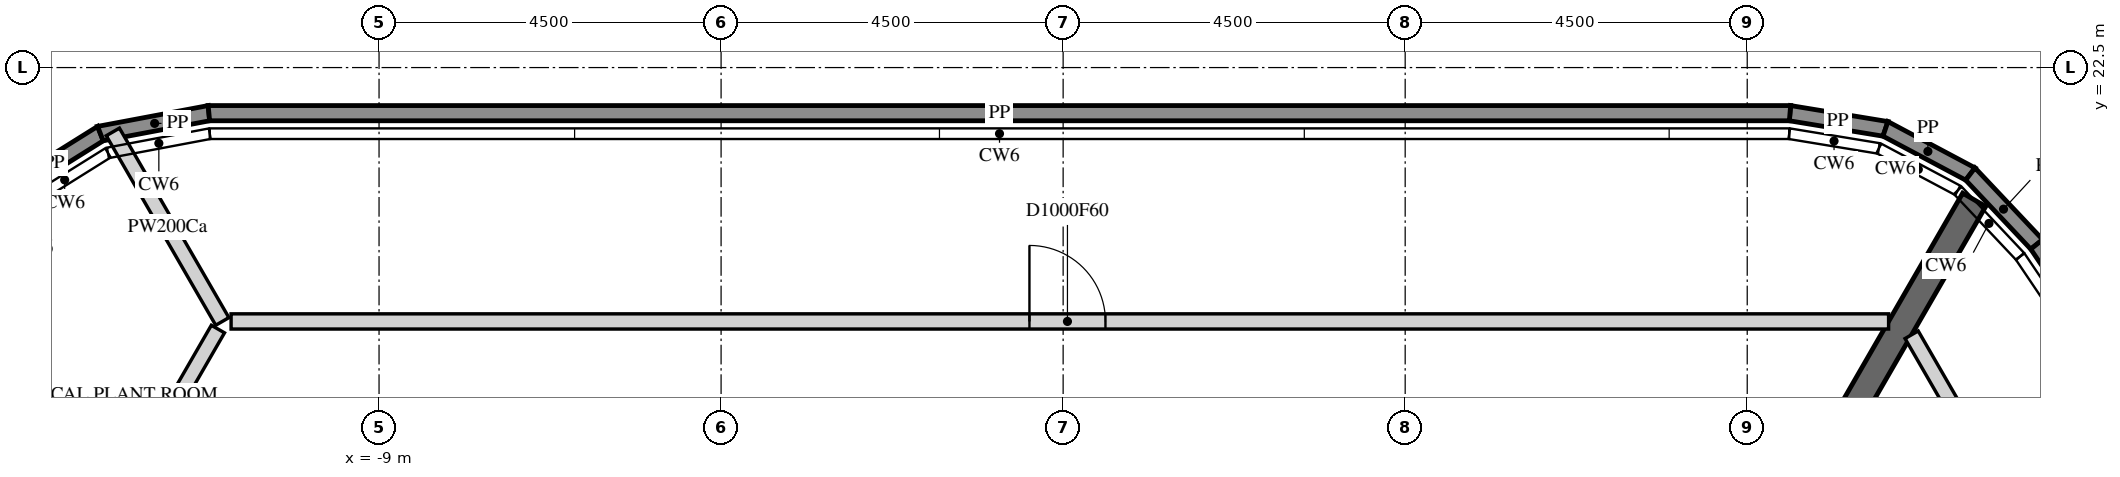
"""IFC4 building model, lengths in metres.
Left out: names, types, materials, properties, quantities, classifications, styles, units other than length and angle.
Written with IfcOpenShell. Run it as: python <this file> out.ifc"""

import sys

from ifc_helpers import new_model, si_unit, direction, frame, frame_2d, origin, place, context, subcontext, project, spatial, polyline, rectangle, outline, extrude, element, fill, save


model = new_model("IFC4")
c1 = context("Model", 3, precision=1e-05, world=origin(), true_north=direction((0.0, 1.0)))
c2 = subcontext(c1, "Body", "Model", "MODEL_VIEW")
j1 = project(units=[si_unit("LENGTHUNIT", "METRE"), si_unit("PLANEANGLEUNIT", "RADIAN")], contexts=[c1])
p1 = place(None, origin())
s1 = spatial("IfcSite", under=j1, at=p1, CompositionType="ELEMENT")
p2 = place(p1, origin())
s2 = spatial("IfcBuilding", under=s1, at=p2, CompositionType="ELEMENT")
p3 = place(p2, frame((0.0, 0.0, 388.2)))
s3 = spatial("IfcBuildingStorey", under=s2, at=p3, CompositionType="ELEMENT", Elevation=388.2)
p4 = place(p3, frame((9.562, 21.9, 4.5), z_axis=(0.0, 0.0, 1.0), x_axis=(0.986779937267, -0.162065898346, 0.0)))
e1 = element("IfcWall", 1, at=p4, inside=s3, PredefinedType="PARAPET", context=c2, shape_type="SweptSolid", body=[
    extrude(outline(polyline([(0.008, -0.1), (1.257, -0.1), (1.289, 0.1), (-0.008, 0.1), (0.008, -0.1)])), origin(), (0.0, 0.0, 1.0), 1.1),
])
p5 = place(p3, frame((10.819, 21.694, 4.5), z_axis=(0.0, 0.0, 1.0), x_axis=(0.88290815292, -0.469545731008, 0.0)))
e2 = element("IfcWall", 2, at=p5, inside=s3, PredefinedType="PARAPET", context=c2, shape_type="SweptSolid", body=[
    extrude(outline(polyline([(0.016, -0.1), (1.248, -0.1), (1.281, 0.1), (-0.016, 0.1), (0.016, -0.1)])), origin(), (0.0, 0.0, 1.0), 1.1),
])
p6 = place(p3, frame((11.935, 21.1, 4.5), z_axis=(0.0, 0.0, 1.0), x_axis=(0.686285527981, -0.727332230885, 0.0)))
e3 = element("IfcWall", 3, at=p6, inside=s3, PredefinedType="PARAPET", context=c2, shape_type="SweptSolid", body=[
    extrude(outline(polyline([(0.016, -0.1), (1.265, -0.1), (1.281, 0.1), (-0.016, 0.1), (0.016, -0.1)])), origin(), (0.0, 0.0, 1.0), 1.1),
])
p7 = place(p3, frame((12.809, 20.174, 4.5), z_axis=(0.0, 0.0, 1.0), x_axis=(0.559199078033, -0.829033407727, 0.0)))
e4 = element("IfcWall", 4, at=p7, inside=s3, PredefinedType="PARAPET", context=c2, shape_type="SweptSolid", body=[
    extrude(outline(polyline([(0.008, -0.1), (20.792, -0.1), (20.81, 0.1), (-0.008, 0.1), (0.008, -0.1)])), origin(), (0.0, 0.0, 1.0), 1.1),
])
p8 = place(p3, frame((-13.89, 20.866, 4.5), z_axis=(0.0, 0.0, 1.0), x_axis=(0.848083831846, 0.529862070884, 0.0)))
e5 = element("IfcWall", 5, at=p8, inside=s3, PredefinedType="PARAPET", context=c2, shape_type="SweptSolid", body=[
    extrude(outline(polyline([(0.019, -0.1), (1.424, -0.1), (1.462, 0.1), (-0.019, 0.1), (0.019, -0.1)])), origin(), (0.0, 0.0, 1.0), 1.1),
])
p9 = place(p3, frame((-12.666, 21.631, 4.5), z_axis=(0.0, 0.0, 1.0), x_axis=(0.982729187844, 0.185049570005, 0.0)))
e6 = element("IfcWall", 6, at=p9, inside=s3, PredefinedType="PARAPET", context=c2, shape_type="SweptSolid", body=[
    extrude(outline(polyline([(0.019, -0.1), (1.443, -0.1), (1.462, 0.1), (-0.019, 0.1), (0.019, -0.1)])), origin(), (0.0, 0.0, 1.0), 1.1),
])
p10 = place(p3, frame((-11.238, 21.9, 4.5), z_axis=(0.0, 0.0, 1.0), x_axis=(1.0, 0.0, 0.0)))
e7 = element("IfcWall", 7, at=p10, inside=s3, PredefinedType="PARAPET", context=c2, shape_type="SweptSolid", body=[
    extrude(outline(polyline([(0.009, -0.1), (20.793, -0.1), (20.809, 0.1), (-0.009, 0.1), (0.009, -0.1)])), origin(), (0.0, 0.0, 1.0), 1.1),
])
p11 = place(p3, frame((5.773, 10.0, -0.2), z_axis=(0.0, 0.0, 1.0), x_axis=(0.50001273609, 0.866018050475, 0.0)))
e8 = element("IfcWall", 8, at=p11, inside=s3, PredefinedType="SHEAR", context=c2, shape_type="SweptSolid", body=[
    extrude(rectangle(XDim=12.425, YDim=0.35, at=frame_2d((6.212, 0.0))), origin(), (0.0, 0.0, 1.0), 4.5),
])
p12 = place(p11, frame((5.312, 0.0, 0.2)))
e9 = element("IfcOpeningElement", 9, at=p12, cuts=e8, PredefinedType="OPENING", context=c2, shape_type="SweptSolid", body=[
    extrude(rectangle(XDim=1.8, YDim=2.4, at=frame_2d((0.9, 1.2))), frame((0.0, 0.185, 0.0), z_axis=(0.0, -1.0, 0.0), x_axis=(1.0, 0.0, 0.0)), (0.0, 0.0, 1.0), 0.37),
])
p13 = place(p3, frame((-12.502, 21.653, 0.0), z_axis=(0.0, 0.0, 1.0), x_axis=(0.500133489192, -0.865948320045, 0.0)))
e10 = element("IfcWall", 10, at=p13, inside=s3, PredefinedType="PARTITIONING", context=c2, shape_type="SweptSolid", body=[
    extrude(rectangle(XDim=2.879, YDim=0.2, at=frame_2d((1.439, 0.0))), origin(), (0.0, 0.0, 1.0), 4.3),
])
p14 = place(p3, frame((-22.023, 0.175, 0.0), z_axis=(0.0, 0.0, 1.0), x_axis=(0.500001886152, 0.866024314812, 0.0)))
e11 = element("IfcWall", 11, at=p14, inside=s3, PredefinedType="PARTITIONING", context=c2, shape_type="SweptSolid", body=[
    extrude(rectangle(XDim=21.807, YDim=0.2, at=frame_2d((10.903, 0.0))), origin(), (0.0, 0.0, 1.0), 4.3),
])
p15 = place(p14, frame((10.603, 0.0, 0.0)))
e12 = element("IfcOpeningElement", 12, at=p15, cuts=e11, PredefinedType="OPENING", context=c2, shape_type="SweptSolid", body=[
    extrude(rectangle(XDim=1.0, YDim=2.1, at=frame_2d((0.5, 1.05))), frame((0.0, 0.11, 0.0), z_axis=(0.0, -1.0, 0.0), x_axis=(1.0, 0.0, 0.0)), (0.0, 0.0, 1.0), 0.22),
])
p16 = place(p3, frame((-10.947, 19.16, 0.0), z_axis=(0.0, 0.0, 1.0), x_axis=(1.0, 0.0, 0.0)))
e13 = element("IfcWall", 13, at=p16, inside=s3, PredefinedType="PARTITIONING", context=c2, shape_type="SweptSolid", body=[
    extrude(rectangle(XDim=21.807, YDim=0.2, at=frame_2d((10.903, 0.0))), origin(), (0.0, 0.0, 1.0), 4.3),
])
p17 = place(p16, frame((10.503, 0.0, 0.0)))
e14 = element("IfcOpeningElement", 14, at=p17, cuts=e13, PredefinedType="OPENING", context=c2, shape_type="SweptSolid", body=[
    extrude(rectangle(XDim=1.0, YDim=2.1, at=frame_2d((0.5, 1.05))), frame((0.0, 0.11, 0.0), z_axis=(0.0, -1.0, 0.0), x_axis=(1.0, 0.0, 0.0)), (0.0, 0.0, 1.0), 0.22),
])
p18 = place(p3, frame((11.163, 18.985, 0.0), z_axis=(0.0, 0.0, 1.0), x_axis=(0.499993489295, -0.866029162709, 0.0)))
e15 = element("IfcWall", 15, at=p18, inside=s3, PredefinedType="PARTITIONING", context=c2, shape_type="SweptSolid", body=[
    extrude(rectangle(XDim=21.806, YDim=0.2, at=frame_2d((10.903, 0.0))), origin(), (0.0, 0.0, 1.0), 4.3),
])
p19 = place(p18, frame((10.603, 0.0, 0.0)))
e16 = element("IfcOpeningElement", 16, at=p19, cuts=e15, PredefinedType="OPENING", context=c2, shape_type="SweptSolid", body=[
    extrude(rectangle(XDim=1.0, YDim=2.1, at=frame_2d((0.5, 1.05))), frame((0.0, 0.11, 0.0), z_axis=(0.0, -1.0, 0.0), x_axis=(1.0, 0.0, 0.0)), (0.0, 0.0, 1.0), 0.22),
])
p20 = place(p17, origin())
e17 = element("IfcDoor", 17, at=p20, inside=s3, OperationType="SINGLE_SWING_RIGHT", PredefinedType="DOOR", context=c2, shape_type="SweptSolid", body=[
    extrude(rectangle(XDim=1.0, YDim=2.1, at=frame_2d((0.5, 1.05))), frame((0.0, 0.025, 0.0), z_axis=(0.0, -1.0, 0.0), x_axis=(1.0, 0.0, 0.0)), (0.0, 0.0, 1.0), 0.05),
])
fill(e14, e17)
save(model, sys.argv[1])
